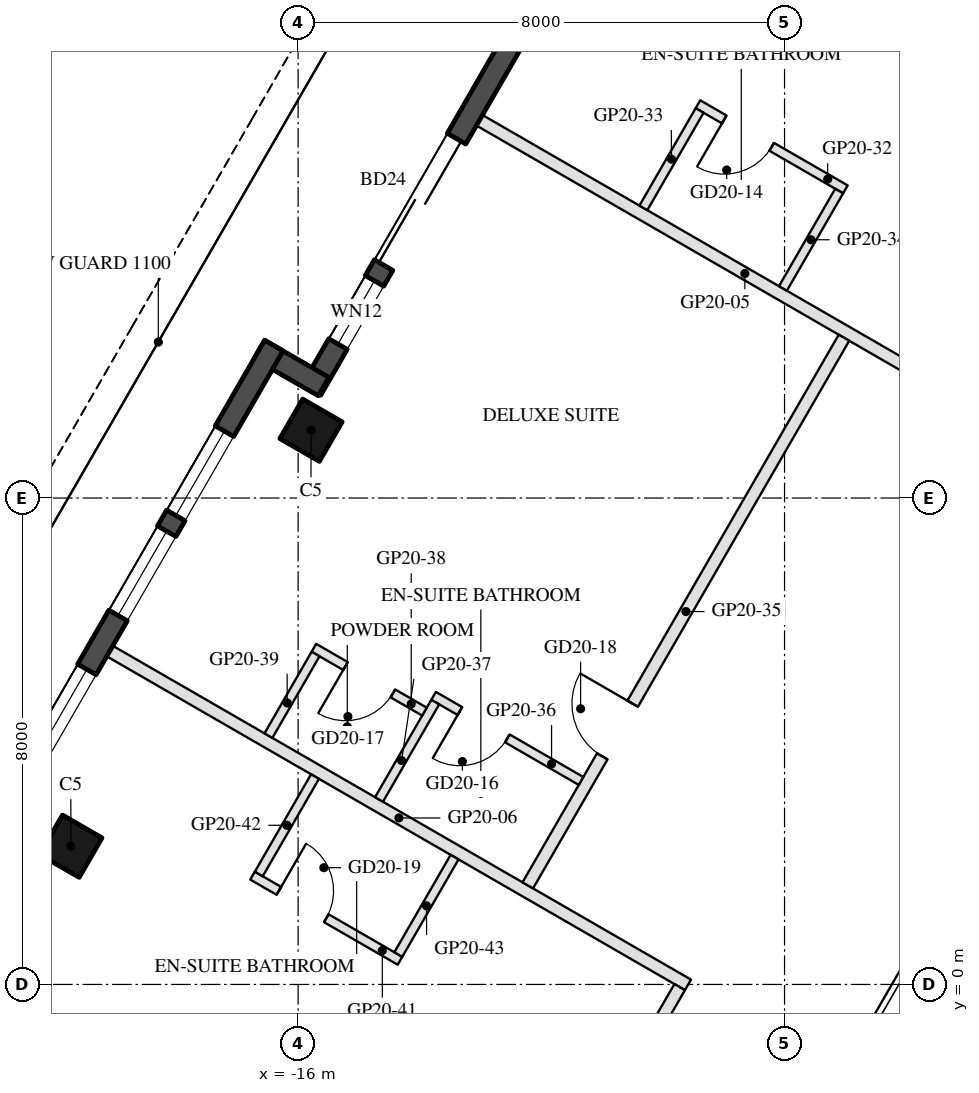
"""IFC4 building model, lengths in metres.
Left out: names, types, materials, properties, quantities, classifications, styles, units other than length and angle.
Written with IfcOpenShell. Run it as: python <this file> out.ifc"""

import sys

from ifc_helpers import new_model, si_unit, direction, frame, frame_2d, origin, origin_2d, place, context, subcontext, project, spatial, rectangle, hollow_rectangle, extrude, element, fill, save


model = new_model("IFC4")
c1 = context("Model", 3, precision=1e-05, world=origin(), true_north=direction((0.0, 1.0)))
c2 = subcontext(c1, "Body", "Model", "MODEL_VIEW")
j1 = project(units=[si_unit("LENGTHUNIT", "METRE"), si_unit("PLANEANGLEUNIT", "RADIAN")], contexts=[c1])
p1 = place(None, origin())
s1 = spatial("IfcSite", under=j1, at=p1, CompositionType="ELEMENT")
p2 = place(p1, origin())
s2 = spatial("IfcBuilding", under=s1, at=p2, CompositionType="ELEMENT")
p3 = place(p2, frame((0.0, 0.0, 209.5)))
s3 = spatial("IfcBuildingStorey", under=s2, at=p3, CompositionType="ELEMENT", Elevation=209.5)
for number, where, z_axis, x_axis in (
    (1, (-15.788, 9.115, 0.0), (0.0, 0.0, 1.0), (0.5, 0.866, 0.0)),
    (2, (-19.738, 2.273, 0.0), (0.0, 0.0, 1.0), (0.5, 0.866, 0.0)),
):
    element("IfcColumn", number, at=place(p3, frame(where, z_axis=z_axis, x_axis=x_axis)), inside=s3, PredefinedType="COLUMN", context=c2, shape_type="SweptSolid", body=[
        extrude(hollow_rectangle(XDim=0.75, YDim=0.75, WallThickness=0.035, at=origin_2d()), origin(), (0.0, 0.0, 1.0), 3.7),
    ])
p4 = place(p3, frame((-13.413, 16.029, 0.0), z_axis=(0.0, 0.0, 1.0), x_axis=(0.866005645448, -0.500034220881, 0.0)))
e3 = element("IfcWall", 3, at=p4, inside=s3, PredefinedType="SOLIDWALL", context=c2, shape_type="SweptSolid", body=[
    extrude(rectangle(XDim=1.22, YDim=0.35, at=frame_2d((0.61, 0.0))), origin(), (0.0, 0.0, 1.0), 3.55),
])
p5 = place(p3, frame((-12.409, 15.617, 0.0), z_axis=(0.0, 0.0, 1.0), x_axis=(-0.500003597184, -0.866023326939, 0.0)))
e4 = element("IfcWall", 4, at=p5, inside=s3, PredefinedType="SOLIDWALL", context=c2, shape_type="SweptSolid", body=[
    extrude(rectangle(XDim=6.74, YDim=0.35, at=frame_2d((3.37, 0.0))), origin(), (0.0, 0.0, 1.0), 3.55),
])
p6 = place(p5, frame((1.97, 0.0, 0.0)))
e5 = element("IfcOpeningElement", 5, at=p6, cuts=e4, PredefinedType="OPENING", context=c2, shape_type="SweptSolid", body=[
    extrude(rectangle(XDim=2.4, YDim=2.4, at=frame_2d((1.2, 1.2))), frame((0.0, 0.185, 0.0), z_axis=(0.0, -1.0, 0.0), x_axis=(1.0, 0.0, 0.0)), (0.0, 0.0, 1.0), 0.37),
])
p7 = place(p5, frame((4.67, 0.0, 0.3)))
e6 = element("IfcOpeningElement", 6, at=p7, cuts=e4, PredefinedType="OPENING", context=c2, shape_type="SweptSolid", body=[
    extrude(rectangle(XDim=1.2, YDim=2.65, at=frame_2d((0.6, 1.325))), frame((0.0, 0.185, 0.0), z_axis=(0.0, -1.0, 0.0), x_axis=(1.0, 0.0, 0.0)), (0.0, 0.0, 1.0), 0.37),
])
p8 = place(p3, frame((-15.581, 9.833, 0.0), z_axis=(0.0, 0.0, 1.0), x_axis=(-0.866055662726, 0.499947586314, 0.0)))
e7 = element("IfcWall", 7, at=p8, inside=s3, PredefinedType="SOLIDWALL", context=c2, shape_type="SweptSolid", body=[
    extrude(rectangle(XDim=1.22, YDim=0.35, at=frame_2d((0.61, 0.0))), origin(), (0.0, 0.0, 1.0), 3.55),
])
p9 = place(p3, frame((-16.398, 10.507, 0.0), z_axis=(0.0, 0.0, 1.0), x_axis=(-0.499999142773, -0.866025898704, 0.0)))
e8 = element("IfcWall", 8, at=p9, inside=s3, PredefinedType="SOLIDWALL", context=c2, shape_type="SweptSolid", body=[
    extrude(rectangle(XDim=9.7, YDim=0.35, at=frame_2d((4.85, 0.0))), origin(), (0.0, 0.0, 1.0), 3.55),
])
p10 = place(p9, frame((1.625, 0.0, 0.3)))
e9 = element("IfcOpeningElement", 9, at=p10, cuts=e8, PredefinedType="OPENING", context=c2, shape_type="SweptSolid", body=[
    extrude(rectangle(XDim=1.6, YDim=2.65, at=frame_2d((0.8, 1.325))), frame((0.0, 0.185, 0.0), z_axis=(0.0, -1.0, 0.0), x_axis=(1.0, 0.0, 0.0)), (0.0, 0.0, 1.0), 0.37),
])
p11 = place(p9, frame((3.525, 0.0, 0.3)))
e10 = element("IfcOpeningElement", 10, at=p11, cuts=e8, PredefinedType="OPENING", context=c2, shape_type="SweptSolid", body=[
    extrude(rectangle(XDim=1.6, YDim=2.65, at=frame_2d((0.8, 1.325))), frame((0.0, 0.185, 0.0), z_axis=(0.0, -1.0, 0.0), x_axis=(1.0, 0.0, 0.0)), (0.0, 0.0, 1.0), 0.37),
])
p12 = place(p9, frame((6.15, 0.0, 0.3)))
e11 = element("IfcOpeningElement", 11, at=p12, cuts=e8, PredefinedType="OPENING", context=c2, shape_type="SweptSolid", body=[
    extrude(rectangle(XDim=1.9, YDim=2.65, at=frame_2d((0.95, 1.325))), frame((0.0, 0.185, 0.0), z_axis=(0.0, -1.0, 0.0), x_axis=(1.0, 0.0, 0.0)), (0.0, 0.0, 1.0), 0.37),
])
p13 = place(p3, frame((-13.018, 14.213, 0.0), z_axis=(0.0, 0.0, 1.0), x_axis=(0.866022637375, -0.500004791531, 0.0)))
e12 = element("IfcWall", 12, at=p13, inside=s3, PredefinedType="PARTITIONING", context=c2, shape_type="SweptSolid", body=[
    extrude(rectangle(XDim=10.08, YDim=0.2, at=frame_2d((5.04, 0.0))), origin(), (0.0, 0.0, 1.0), 3.06),
])
p14 = place(p3, frame((-19.097, 5.483, 0.0), z_axis=(0.0, 0.0, 1.0), x_axis=(0.866027479907, -0.499996404033, 0.0)))
e13 = element("IfcWall", 13, at=p14, inside=s3, PredefinedType="PARTITIONING", context=c2, shape_type="SweptSolid", body=[
    extrude(rectangle(XDim=10.98, YDim=0.2, at=frame_2d((5.49, 0.0))), origin(), (0.0, 0.0, 1.0), 3.06),
])
p15 = place(p3, frame((-7.0, 13.077, 0.0), z_axis=(0.0, 0.0, 1.0), x_axis=(-0.866034573852, 0.49998411664, 0.0)))
e14 = element("IfcWall", 14, at=p15, inside=s3, PredefinedType="PARTITIONING", context=c2, shape_type="SweptSolid", body=[
    extrude(rectangle(XDim=2.8, YDim=0.15, at=frame_2d((1.4, 0.0))), origin(), (0.0, 0.0, 1.0), 2.95),
])
p16 = place(p15, frame((1.4, 0.0, 0.0)))
e15 = element("IfcOpeningElement", 15, at=p16, cuts=e14, PredefinedType="OPENING", context=c2, shape_type="SweptSolid", body=[
    extrude(rectangle(XDim=0.9, YDim=2.1, at=frame_2d((0.45, 1.05))), frame((0.0, 0.085, 0.0), z_axis=(0.0, -1.0, 0.0), x_axis=(1.0, 0.0, 0.0)), (0.0, 0.0, 1.0), 0.17),
])
for number, where, z_axis, x_axis in (
    (16, (-9.397, 14.374, 0.0), (0.0, 0.0, 1.0), (-0.5, -0.866, 0.0)),
    (17, (-7.102, 13.049, 0.0), (0.0, 0.0, 1.0), (-0.5, -0.866, 0.0)),
):
    element("IfcWall", number, at=place(p3, frame(where, z_axis=z_axis, x_axis=x_axis)), inside=s3, PredefinedType="PARTITIONING", context=c2, shape_type="SweptSolid", body=[
        extrude(rectangle(XDim=1.85, YDim=0.15, at=frame_2d((0.925, 0.0))), origin(), (0.0, 0.0, 1.0), 3.55),
    ])
p17 = place(p3, frame((-12.223, 1.63, 0.0), z_axis=(0.0, 0.0, 1.0), x_axis=(0.499999493275, 0.866025696342, 0.0)))
e18 = element("IfcWall", 18, at=p17, inside=s3, PredefinedType="PARTITIONING", context=c2, shape_type="SweptSolid", body=[
    extrude(rectangle(XDim=10.4, YDim=0.2, at=frame_2d((5.2, 0.0))), origin(), (0.0, 0.0, 1.0), 2.95),
])
p18 = place(p17, frame((2.45, 0.0, 0.0)))
e19 = element("IfcOpeningElement", 19, at=p18, cuts=e18, PredefinedType="OPENING", context=c2, shape_type="SweptSolid", body=[
    extrude(rectangle(XDim=1.0, YDim=2.1, at=frame_2d((0.5, 1.05))), frame((0.0, 0.11, 0.0), z_axis=(0.0, -1.0, 0.0), x_axis=(1.0, 0.0, 0.0)), (0.0, 0.0, 1.0), 0.22),
])
p19 = place(p3, frame((-11.347, 3.347, 0.0), z_axis=(0.0, 0.0, 1.0), x_axis=(-0.866018616679, 0.500011755427, 0.0)))
e20 = element("IfcWall", 20, at=p19, inside=s3, PredefinedType="PARTITIONING", context=c2, shape_type="SweptSolid", body=[
    extrude(rectangle(XDim=2.8, YDim=0.15, at=frame_2d((1.4, 0.0))), origin(), (0.0, 0.0, 1.0), 3.55),
])
p20 = place(p19, frame((1.4, 0.0, 0.0)))
e21 = element("IfcOpeningElement", 21, at=p20, cuts=e20, PredefinedType="OPENING", context=c2, shape_type="SweptSolid", body=[
    extrude(rectangle(XDim=0.9, YDim=2.1, at=frame_2d((0.45, 1.05))), frame((0.0, 0.085, 0.0), z_axis=(0.0, -1.0, 0.0), x_axis=(1.0, 0.0, 0.0)), (0.0, 0.0, 1.0), 0.17),
])
p21 = place(p3, frame((-13.744, 4.644, 0.0), z_axis=(0.0, 0.0, 1.0), x_axis=(-0.500042316284, -0.866000971088, 0.0)))
e22 = element("IfcWall", 22, at=p21, inside=s3, PredefinedType="PARTITIONING", context=c2, shape_type="SweptSolid", body=[
    extrude(rectangle(XDim=1.85, YDim=0.15, at=frame_2d((0.925, 0.0))), origin(), (0.0, 0.0, 1.0), 2.95),
])
p22 = place(p3, frame((-13.922, 4.487, 0.0), z_axis=(0.0, 0.0, 1.0), x_axis=(-0.866009402589, 0.500027713859, 0.0)))
e23 = element("IfcWall", 23, at=p22, inside=s3, PredefinedType="PARTITIONING", context=c2, shape_type="SweptSolid", body=[
    extrude(rectangle(XDim=2.1, YDim=0.15, at=frame_2d((1.05, 0.0))), origin(), (0.0, 0.0, 1.0), 3.55),
])
p23 = place(p22, frame((0.6, 0.0, 0.0)))
e24 = element("IfcOpeningElement", 24, at=p23, cuts=e23, PredefinedType="OPENING", context=c2, shape_type="SweptSolid", body=[
    extrude(rectangle(XDim=0.9, YDim=2.1, at=frame_2d((0.45, 1.05))), frame((0.0, 0.085, 0.0), z_axis=(0.0, -1.0, 0.0), x_axis=(1.0, 0.0, 0.0)), (0.0, 0.0, 1.0), 0.17),
])
p24 = place(p3, frame((-15.713, 5.435, 0.0), z_axis=(0.0, 0.0, 1.0), x_axis=(-0.499967891604, -0.866043940782, 0.0)))
e25 = element("IfcWall", 25, at=p24, inside=s3, PredefinedType="PARTITIONING", context=c2, shape_type="SweptSolid", body=[
    extrude(rectangle(XDim=1.55, YDim=0.15, at=frame_2d((0.775, 0.0))), origin(), (0.0, 0.0, 1.0), 2.95),
])
p25 = place(p3, frame((-12.269, -4.45, 0.0), z_axis=(0.0, 0.0, 1.0), x_axis=(0.500014573982, 0.866016989329, 0.0)))
e26 = element("IfcWall", 26, at=p25, inside=s3, PredefinedType="PARTITIONING", context=c2, shape_type="SweptSolid", body=[
    extrude(rectangle(XDim=5.088, YDim=0.2, at=frame_2d((2.544, 0.0))), origin(), (0.0, 0.0, 1.0), 2.95),
])
p26 = place(p25, frame((2.044, 0.0, 0.0)))
e27 = element("IfcOpeningElement", 27, at=p26, cuts=e26, PredefinedType="OPENING", context=c2, shape_type="SweptSolid", body=[
    extrude(rectangle(XDim=1.0, YDim=2.1, at=frame_2d((0.5, 1.05))), frame((0.0, 0.11, 0.0), z_axis=(0.0, -1.0, 0.0), x_axis=(1.0, 0.0, 0.0)), (0.0, 0.0, 1.0), 0.22),
])
p27 = place(p3, frame((-16.749, 1.789, 0.0), z_axis=(0.0, 0.0, 1.0), x_axis=(0.866034573852, -0.49998411664, 0.0)))
e28 = element("IfcWall", 28, at=p27, inside=s3, PredefinedType="PARTITIONING", context=c2, shape_type="SweptSolid", body=[
    extrude(rectangle(XDim=2.8, YDim=0.15, at=frame_2d((1.4, 0.0))), origin(), (0.0, 0.0, 1.0), 3.55),
])
p28 = place(p27, frame((0.5, 0.0, 0.0)))
e29 = element("IfcOpeningElement", 29, at=p28, cuts=e28, PredefinedType="OPENING", context=c2, shape_type="SweptSolid", body=[
    extrude(rectangle(XDim=0.9, YDim=2.1, at=frame_2d((0.45, 1.05))), frame((0.0, 0.085, 0.0), z_axis=(0.0, -1.0, 0.0), x_axis=(1.0, 0.0, 0.0)), (0.0, 0.0, 1.0), 0.17),
])
p29 = place(p3, frame((-15.722, 3.419, 0.0), z_axis=(0.0, 0.0, 1.0), x_axis=(-0.500042316284, -0.866000971088, 0.0)))
e30 = element("IfcWall", 30, at=p29, inside=s3, PredefinedType="PARTITIONING", context=c2, shape_type="SweptSolid", body=[
    extrude(rectangle(XDim=1.85, YDim=0.15, at=frame_2d((0.925, 0.0))), origin(), (0.0, 0.0, 1.0), 3.55),
])
p30 = place(p3, frame((-13.427, 2.094, 0.0), z_axis=(0.0, 0.0, 1.0), x_axis=(-0.499886193382, -0.866091100096, 0.0)))
e31 = element("IfcWall", 31, at=p30, inside=s3, PredefinedType="PARTITIONING", context=c2, shape_type="SweptSolid", body=[
    extrude(rectangle(XDim=1.85, YDim=0.15, at=frame_2d((0.925, 0.0))), origin(), (0.0, 0.0, 1.0), 3.55),
])
p31 = place(p6, frame((2.4, 0.0, 0.0), z_axis=(0.0, 0.0, 1.0), x_axis=(-1.0, 0.0, 0.0)))
e32 = element("IfcDoor", 32, at=p31, inside=s3, OperationType="SLIDING_TO_LEFT", PredefinedType="DOOR", context=c2, shape_type="SweptSolid", body=[
    extrude(rectangle(XDim=2.4, YDim=2.4, at=frame_2d((1.2, 1.2))), frame((0.0, 0.025, 0.0), z_axis=(0.0, -1.0, 0.0), x_axis=(1.0, 0.0, 0.0)), (0.0, 0.0, 1.0), 0.05),
])
fill(e5, e32)
p32 = place(p7, origin())
e33 = element("IfcWindow", 33, at=p32, inside=s3, PartitioningType="SINGLE_PANEL", PredefinedType="WINDOW", context=c2, shape_type="SweptSolid", body=[
    extrude(rectangle(XDim=1.2, YDim=2.65, at=frame_2d((0.6, 1.325))), frame((0.0, 0.03, 0.0), z_axis=(0.0, -1.0, 0.0), x_axis=(1.0, 0.0, 0.0)), (0.0, 0.0, 1.0), 0.06),
])
fill(e6, e33)
p33 = place(p10, origin())
e34 = element("IfcWindow", 34, at=p33, inside=s3, PartitioningType="SINGLE_PANEL", PredefinedType="WINDOW", context=c2, shape_type="SweptSolid", body=[
    extrude(rectangle(XDim=1.6, YDim=2.65, at=frame_2d((0.8, 1.325))), frame((0.0, 0.03, 0.0), z_axis=(0.0, -1.0, 0.0), x_axis=(1.0, 0.0, 0.0)), (0.0, 0.0, 1.0), 0.06),
])
fill(e9, e34)
p34 = place(p11, origin())
e35 = element("IfcWindow", 35, at=p34, inside=s3, PartitioningType="SINGLE_PANEL", PredefinedType="WINDOW", context=c2, shape_type="SweptSolid", body=[
    extrude(rectangle(XDim=1.6, YDim=2.65, at=frame_2d((0.8, 1.325))), frame((0.0, 0.03, 0.0), z_axis=(0.0, -1.0, 0.0), x_axis=(1.0, 0.0, 0.0)), (0.0, 0.0, 1.0), 0.06),
])
fill(e10, e35)
p35 = place(p12, origin())
e36 = element("IfcWindow", 36, at=p35, inside=s3, PartitioningType="SINGLE_PANEL", PredefinedType="WINDOW", context=c2, shape_type="SweptSolid", body=[
    extrude(rectangle(XDim=1.9, YDim=2.65, at=frame_2d((0.95, 1.325))), frame((0.0, 0.03, 0.0), z_axis=(0.0, -1.0, 0.0), x_axis=(1.0, 0.0, 0.0)), (0.0, 0.0, 1.0), 0.06),
])
fill(e11, e36)
p36 = place(p16, origin())
e37 = element("IfcDoor", 37, at=p36, inside=s3, OperationType="SINGLE_SWING_RIGHT", PredefinedType="DOOR", context=c2, shape_type="SweptSolid", body=[
    extrude(rectangle(XDim=0.9, YDim=2.1, at=frame_2d((0.45, 1.05))), frame((0.0, 0.025, 0.0), z_axis=(0.0, -1.0, 0.0), x_axis=(1.0, 0.0, 0.0)), (0.0, 0.0, 1.0), 0.05),
])
fill(e15, e37)
p37 = place(p20, origin())
e38 = element("IfcDoor", 38, at=p37, inside=s3, OperationType="SINGLE_SWING_RIGHT", PredefinedType="DOOR", context=c2, shape_type="SweptSolid", body=[
    extrude(rectangle(XDim=0.9, YDim=2.1, at=frame_2d((0.45, 1.05))), frame((0.0, 0.025, 0.0), z_axis=(0.0, -1.0, 0.0), x_axis=(1.0, 0.0, 0.0)), (0.0, 0.0, 1.0), 0.05),
])
fill(e21, e38)
p38 = place(p23, origin())
e39 = element("IfcDoor", 39, at=p38, inside=s3, OperationType="SINGLE_SWING_RIGHT", PredefinedType="DOOR", context=c2, shape_type="SweptSolid", body=[
    extrude(rectangle(XDim=0.9, YDim=2.1, at=frame_2d((0.45, 1.05))), frame((0.0, 0.025, 0.0), z_axis=(0.0, -1.0, 0.0), x_axis=(1.0, 0.0, 0.0)), (0.0, 0.0, 1.0), 0.05),
])
fill(e24, e39)
p39 = place(p18, origin())
e40 = element("IfcDoor", 40, at=p39, inside=s3, OperationType="SINGLE_SWING_RIGHT", PredefinedType="DOOR", context=c2, shape_type="SweptSolid", body=[
    extrude(rectangle(XDim=1.0, YDim=2.1, at=frame_2d((0.5, 1.05))), frame((0.0, 0.025, 0.0), z_axis=(0.0, -1.0, 0.0), x_axis=(1.0, 0.0, 0.0)), (0.0, 0.0, 1.0), 0.05),
])
fill(e19, e40)
p40 = place(p28, origin())
e41 = element("IfcDoor", 41, at=p40, inside=s3, OperationType="SINGLE_SWING_LEFT", PredefinedType="DOOR", context=c2, shape_type="SweptSolid", body=[
    extrude(rectangle(XDim=0.9, YDim=2.1, at=frame_2d((0.45, 1.05))), frame((0.0, 0.025, 0.0), z_axis=(0.0, -1.0, 0.0), x_axis=(1.0, 0.0, 0.0)), (0.0, 0.0, 1.0), 0.05),
])
fill(e29, e41)
save(model, sys.argv[1])
